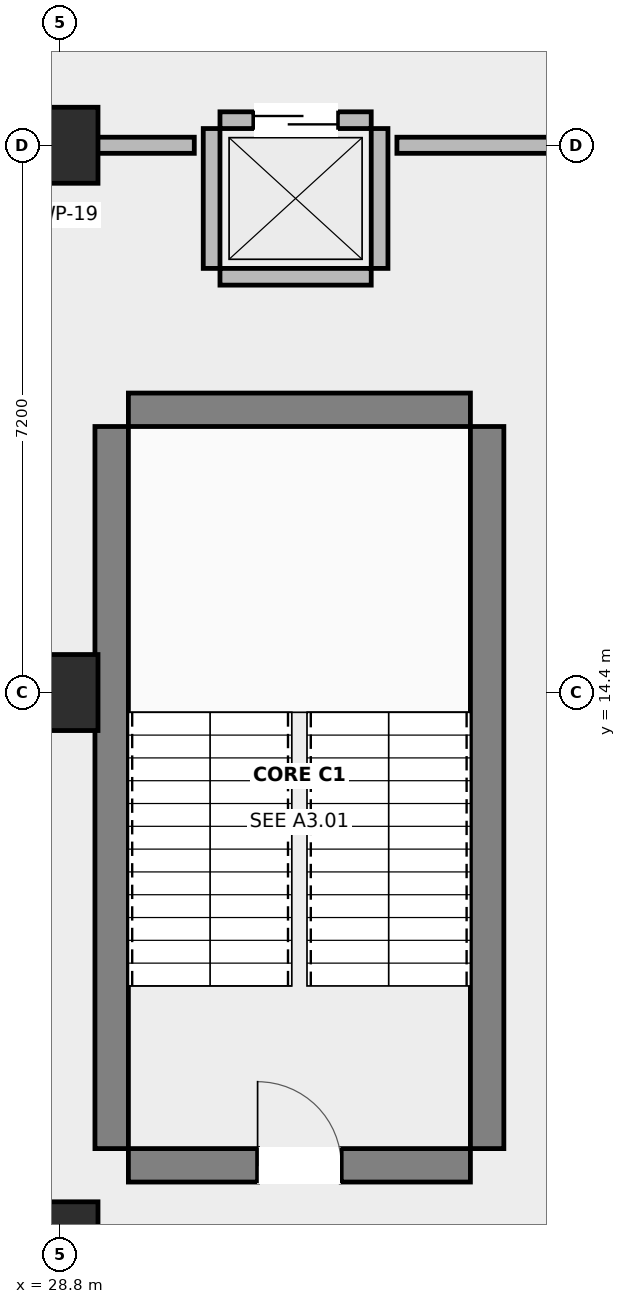
"""IFC4 building model, lengths in metres.
Left out: names, types, materials, properties, quantities, classifications, styles, units other than length and angle.
Written with IfcOpenShell. Run it as: python <this file> out.ifc"""

import sys

from ifc_helpers import new_model, si_unit, direction, frame, frame_2d, origin, origin_2d, place, context, subcontext, project, spatial, rectangle, extrude, element, fill, save


model = new_model("IFC4")
c1 = context("Model", 3, precision=1e-05, world=origin(), true_north=direction((0.0, 1.0)))
c2 = subcontext(c1, "Body", "Model", "MODEL_VIEW")
j1 = project(units=[si_unit("LENGTHUNIT", "METRE"), si_unit("PLANEANGLEUNIT", "RADIAN")], contexts=[c1])
p1 = place(None, origin())
s1 = spatial("IfcSite", under=j1, at=p1, CompositionType="ELEMENT")
p2 = place(p1, origin())
s2 = spatial("IfcBuilding", under=s1, at=p2, CompositionType="ELEMENT")
p3 = place(p2, frame((0.0, 0.0, -4.5)))
s3 = spatial("IfcBuildingStorey", under=s2, at=p3, CompositionType="ELEMENT", Elevation=-4.5)
for number, where, z_axis, x_axis in (
    (1, (28.8, 7.2, 0.0), (0.0, 0.0, 1.0), (1.0, 0.0, 0.0)),
    (2, (28.8, 14.4, 0.0), (0.0, 0.0, 1.0), (1.0, 0.0, 0.0)),
    (3, (28.8, 21.6, 0.0), (0.0, 0.0, 1.0), (1.0, 0.0, 0.0)),
):
    element("IfcColumn", number, at=place(p3, frame(where, z_axis=z_axis, x_axis=x_axis)), inside=s3, PredefinedType="COLUMN", context=c2, shape_type="SweptSolid", body=[
        extrude(rectangle(XDim=1.0, YDim=1.0, at=origin_2d()), origin(), (0.0, 0.0, 1.0), 4.15),
    ])
p4 = place(p3, frame((29.7, 8.18, 0.0), z_axis=(0.0, 0.0, 1.0), x_axis=(1.0, 0.0, 0.0)))
e4 = element("IfcWall", 4, at=p4, inside=s3, PredefinedType="SHEAR", context=c2, shape_type="SweptSolid", body=[
    extrude(rectangle(XDim=4.5, YDim=0.44, at=frame_2d((2.25, 0.0))), origin(), (0.0, 0.0, 1.0), 4.15),
])
p5 = place(p4, frame((1.7, 0.0, 0.0)))
e5 = element("IfcOpeningElement", 5, at=p5, cuts=e4, PredefinedType="OPENING", context=c2, shape_type="SweptSolid", body=[
    extrude(rectangle(XDim=1.1, YDim=2.15, at=frame_2d((0.55, 1.075))), frame((0.0, 0.23, 0.0), z_axis=(0.0, -1.0, 0.0), x_axis=(1.0, 0.0, 0.0)), (0.0, 0.0, 1.0), 0.46),
])
p6 = place(p3, frame((29.7, 18.12, 0.0), z_axis=(0.0, 0.0, 1.0), x_axis=(1.0, 0.0, 0.0)))
e6 = element("IfcWall", 6, at=p6, inside=s3, PredefinedType="SHEAR", context=c2, shape_type="SweptSolid", body=[
    extrude(rectangle(XDim=4.5, YDim=0.44, at=frame_2d((2.25, 0.0))), origin(), (0.0, 0.0, 1.0), 4.15),
])
for number, where, z_axis, x_axis in (
    (7, (29.48, 8.4, 0.0), (0.0, 0.0, 1.0), (0.0, 1.0, 0.0)),
    (8, (34.42, 8.4, 0.0), (0.0, 0.0, 1.0), (0.0, 1.0, 0.0)),
):
    element("IfcWall", number, at=place(p3, frame(where, z_axis=z_axis, x_axis=x_axis)), inside=s3, PredefinedType="SHEAR", context=c2, shape_type="SweptSolid", body=[
        extrude(rectangle(XDim=9.5, YDim=0.44, at=frame_2d((4.75, 0.0))), origin(), (0.0, 0.0, 1.0), 4.15),
    ])
p7 = place(p3, frame((30.905, 19.87, 0.0), z_axis=(0.0, 0.0, 1.0), x_axis=(1.0, 0.0, 0.0)))
e9 = element("IfcWall", 9, at=p7, inside=s3, PredefinedType="STANDARD", context=c2, shape_type="SweptSolid", body=[
    extrude(rectangle(XDim=1.99, YDim=0.22, at=frame_2d((0.995, 0.0))), origin(), (0.0, 0.0, 1.0), 3.19),
])
p8 = place(p3, frame((30.905, 21.93, 0.0), z_axis=(0.0, 0.0, 1.0), x_axis=(1.0, 0.0, 0.0)))
e10 = element("IfcWall", 10, at=p8, inside=s3, PredefinedType="STANDARD", context=c2, shape_type="SweptSolid", body=[
    extrude(rectangle(XDim=1.99, YDim=0.22, at=frame_2d((0.995, 0.0))), origin(), (0.0, 0.0, 1.0), 3.19),
])
p9 = place(p8, frame((0.445, 0.0, 0.0)))
e11 = element("IfcOpeningElement", 11, at=p9, cuts=e10, PredefinedType="OPENING", context=c2, shape_type="SweptSolid", body=[
    extrude(rectangle(XDim=1.1, YDim=2.15, at=frame_2d((0.55, 1.075))), frame((0.0, 0.12, 0.0), z_axis=(0.0, -1.0, 0.0), x_axis=(1.0, 0.0, 0.0)), (0.0, 0.0, 1.0), 0.24),
])
for number, where, z_axis, x_axis in (
    (12, (30.795, 19.98, 0.0), (0.0, 0.0, 1.0), (0.0, 1.0, 0.0)),
    (13, (33.005, 19.98, 0.0), (0.0, 0.0, 1.0), (0.0, 1.0, 0.0)),
):
    element("IfcWall", number, at=place(p3, frame(where, z_axis=z_axis, x_axis=x_axis)), inside=s3, PredefinedType="STANDARD", context=c2, shape_type="SweptSolid", body=[
        extrude(rectangle(XDim=1.84, YDim=0.22, at=frame_2d((0.92, 0.0))), origin(), (0.0, 0.0, 1.0), 3.19),
    ])
p10 = place(p3, frame((30.567, 21.6, 0.0), z_axis=(0.0, 0.0, 1.0), x_axis=(-1.0, 0.0, 0.0)))
e14 = element("IfcWall", 14, at=p10, inside=s3, PredefinedType="PARTITIONING", context=c2, shape_type="SweptSolid", body=[
    extrude(rectangle(XDim=3.347, YDim=0.212, at=frame_2d((1.673, 0.0))), origin(), (0.0, 0.0, 1.0), 3.19),
])
p11 = place(p3, frame((35.776, 21.6, 0.0), z_axis=(0.0, 0.0, 1.0), x_axis=(-1.0, 0.0, 0.0)))
e15 = element("IfcWall", 15, at=p11, inside=s3, PredefinedType="PARTITIONING", context=c2, shape_type="SweptSolid", body=[
    extrude(rectangle(XDim=2.543, YDim=0.212, at=frame_2d((1.271, 0.0))), origin(), (0.0, 0.0, 1.0), 3.19),
])
p12 = place(p5, origin())
e16 = element("IfcDoor", 16, at=p12, inside=s3, OperationType="SINGLE_SWING_LEFT", PredefinedType="DOOR", context=c2, shape_type="SweptSolid", body=[
    extrude(rectangle(XDim=1.1, YDim=2.15, at=frame_2d((0.55, 1.075))), frame((0.0, 0.025, 0.0), z_axis=(0.0, -1.0, 0.0), x_axis=(1.0, 0.0, 0.0)), (0.0, 0.0, 1.0), 0.05),
])
fill(e5, e16)
p13 = place(p9, origin())
e17 = element("IfcDoor", 17, at=p13, inside=s3, OperationType="SLIDING_TO_LEFT", PredefinedType="DOOR", context=c2, shape_type="SweptSolid", body=[
    extrude(rectangle(XDim=1.1, YDim=2.15, at=frame_2d((0.55, 1.075))), frame((0.0, 0.025, 0.0), z_axis=(0.0, -1.0, 0.0), x_axis=(1.0, 0.0, 0.0)), (0.0, 0.0, 1.0), 0.05),
])
fill(e11, e17)
save(model, sys.argv[1])
